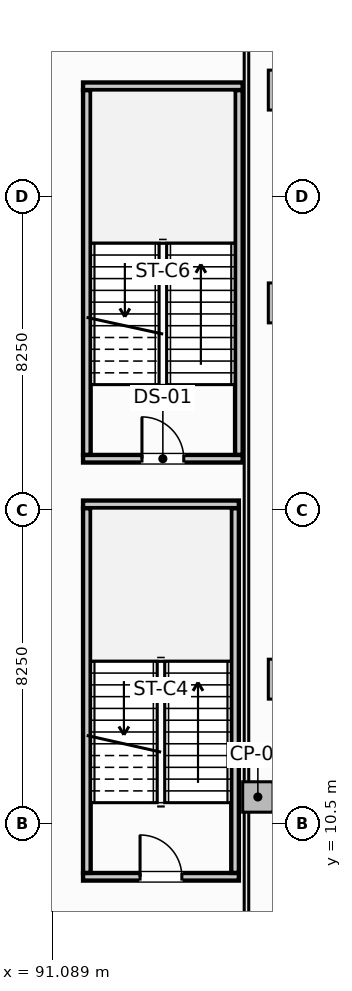
"""IFC4 building model, lengths in metres.
Left out: names, types, materials, properties, quantities, classifications, styles, units other than length and angle.
Written with IfcOpenShell. Run it as: python <this file> out.ifc"""

import sys

from ifc_helpers import new_model, si_unit, direction, frame, frame_2d, origin, origin_2d, place, context, subcontext, project, spatial, rectangle, extrude, element, fill, save


model = new_model("IFC4")
c1 = context("Model", 3, precision=1e-05, world=origin(), true_north=direction((0.0, 1.0)))
c2 = subcontext(c1, "Body", "Model", "MODEL_VIEW")
j1 = project(units=[si_unit("LENGTHUNIT", "METRE"), si_unit("PLANEANGLEUNIT", "RADIAN")], contexts=[c1])
p1 = place(None, origin())
s1 = spatial("IfcSite", under=j1, at=p1, CompositionType="ELEMENT")
p2 = place(p1, origin())
s2 = spatial("IfcBuilding", under=s1, at=p2, CompositionType="ELEMENT")
p3 = place(p2, frame((0.0, 0.0, -13.5)))
s3 = spatial("IfcBuildingStorey", under=s2, at=p3, CompositionType="ELEMENT", Elevation=-13.5)
for number, where, z_axis, x_axis in (
    (1, (97.3, 14.3, -0.5), (0.0, 0.0, 1.0), (1.0, 0.0, 0.0)),
    (2, (97.3, 24.2, -0.5), (0.0, 0.0, 1.0), (1.0, 0.0, 0.0)),
    (3, (97.3, 29.8, -0.5), (0.0, 0.0, 1.0), (1.0, 0.0, 0.0)),
):
    element("IfcColumn", number, at=place(p3, frame(where, z_axis=z_axis, x_axis=x_axis)), inside=s3, PredefinedType="COLUMN", context=c2, shape_type="SweptSolid", body=[
        extrude(rectangle(XDim=1.05, YDim=1.05, at=origin_2d()), origin(), (0.0, 0.0, 1.0), 4.68),
    ])
p4 = place(p3, frame((96.5, 11.2, -0.5), z_axis=(0.0, 0.0, 1.0), x_axis=(1.0, 0.0, 0.0)))
e4 = element("IfcColumn", 4, at=p4, inside=s3, PredefinedType="PILASTER", context=c2, shape_type="SweptSolid", body=[
    extrude(rectangle(XDim=0.8, YDim=0.8, at=origin_2d()), origin(), (0.0, 0.0, 1.0), 4.68),
])
p5 = place(p3, frame((91.9, 9.1, -0.5), z_axis=(0.0, 0.0, 1.0), x_axis=(1.0, 0.0, 0.0)))
e5 = element("IfcWall", 5, at=p5, inside=s3, PredefinedType="SHEAR", context=c2, shape_type="SweptSolid", body=[
    extrude(rectangle(XDim=4.1, YDim=0.2, at=frame_2d((2.05, 0.0))), origin(), (0.0, 0.0, 1.0), 4.68),
])
p6 = place(p5, frame((1.5, 0.0, 0.5)))
e6 = element("IfcOpeningElement", 6, at=p6, cuts=e5, PredefinedType="OPENING", context=c2, shape_type="SweptSolid", body=[
    extrude(rectangle(XDim=1.1, YDim=2.15, at=frame_2d((0.55, 1.075))), frame((0.0, 0.11, 0.0), z_axis=(0.0, -1.0, 0.0), x_axis=(1.0, 0.0, 0.0)), (0.0, 0.0, 1.0), 0.22),
])
p7 = place(p3, frame((91.9, 18.9, -0.5), z_axis=(0.0, 0.0, 1.0), x_axis=(1.0, 0.0, 0.0)))
e7 = element("IfcWall", 7, at=p7, inside=s3, PredefinedType="SHEAR", context=c2, shape_type="SweptSolid", body=[
    extrude(rectangle(XDim=4.1, YDim=0.2, at=frame_2d((2.05, 0.0))), origin(), (0.0, 0.0, 1.0), 4.68),
])
for number, where, z_axis, x_axis in (
    (8, (92.0, 9.202, -0.5), (0.0, 0.0, 1.0), (0.0, 1.0, 0.0)),
    (9, (95.9, 9.202, -0.5), (0.0, 0.0, 1.0), (0.0, 1.0, 0.0)),
):
    element("IfcWall", number, at=place(p3, frame(where, z_axis=z_axis, x_axis=x_axis)), inside=s3, PredefinedType="SHEAR", context=c2, shape_type="SweptSolid", body=[
        extrude(rectangle(XDim=9.596, YDim=0.2, at=frame_2d((4.798, 0.0))), origin(), (0.0, 0.0, 1.0), 4.68),
    ])
p8 = place(p3, frame((91.9, 20.1, -0.5), z_axis=(0.0, 0.0, 1.0), x_axis=(1.0, 0.0, 0.0)))
e10 = element("IfcWall", 10, at=p8, inside=s3, PredefinedType="SHEAR", context=c2, shape_type="SweptSolid", body=[
    extrude(rectangle(XDim=4.2, YDim=0.2, at=frame_2d((2.1, 0.0))), origin(), (0.0, 0.0, 1.0), 4.68),
])
p9 = place(p8, frame((1.55, 0.0, 0.5)))
e11 = element("IfcOpeningElement", 11, at=p9, cuts=e10, PredefinedType="OPENING", context=c2, shape_type="SweptSolid", body=[
    extrude(rectangle(XDim=1.1, YDim=2.15, at=frame_2d((0.55, 1.075))), frame((0.0, 0.11, 0.0), z_axis=(0.0, -1.0, 0.0), x_axis=(1.0, 0.0, 0.0)), (0.0, 0.0, 1.0), 0.22),
])
p10 = place(p3, frame((91.9, 29.9, -0.5), z_axis=(0.0, 0.0, 1.0), x_axis=(1.0, 0.0, 0.0)))
e12 = element("IfcWall", 12, at=p10, inside=s3, PredefinedType="SHEAR", context=c2, shape_type="SweptSolid", body=[
    extrude(rectangle(XDim=4.2, YDim=0.2, at=frame_2d((2.1, 0.0))), origin(), (0.0, 0.0, 1.0), 4.68),
])
for number, where, z_axis, x_axis in (
    (13, (92.0, 20.202, -0.5), (0.0, 0.0, 1.0), (0.0, 1.0, 0.0)),
    (14, (96.0, 20.202, -0.5), (0.0, 0.0, 1.0), (0.0, 1.0, 0.0)),
):
    element("IfcWall", number, at=place(p3, frame(where, z_axis=z_axis, x_axis=x_axis)), inside=s3, PredefinedType="SHEAR", context=c2, shape_type="SweptSolid", body=[
        extrude(rectangle(XDim=9.596, YDim=0.2, at=frame_2d((4.798, 0.0))), origin(), (0.0, 0.0, 1.0), 4.68),
    ])
p11 = place(p3, frame((96.2, 6.612, 0.0), z_axis=(0.0, 0.0, 1.0), x_axis=(0.0, 1.0, 0.0)))
e15 = element("IfcWall", 15, at=p11, inside=s3, PredefinedType="PARTITIONING", context=c2, shape_type="SweptSolid", body=[
    extrude(rectangle(XDim=39.976, YDim=0.12, at=frame_2d((19.988, 0.0))), origin(), (0.0, 0.0, 1.0), 4.18),
])
p12 = place(p6, origin())
e16 = element("IfcDoor", 16, at=p12, inside=s3, OperationType="SINGLE_SWING_LEFT", PredefinedType="DOOR", context=c2, shape_type="SweptSolid", body=[
    extrude(rectangle(XDim=1.1, YDim=2.15, at=frame_2d((0.55, 1.075))), frame((0.0, 0.025, 0.0), z_axis=(0.0, -1.0, 0.0), x_axis=(1.0, 0.0, 0.0)), (0.0, 0.0, 1.0), 0.05),
])
fill(e6, e16)
p13 = place(p9, origin())
e17 = element("IfcDoor", 17, at=p13, inside=s3, OperationType="SINGLE_SWING_LEFT", PredefinedType="DOOR", context=c2, shape_type="SweptSolid", body=[
    extrude(rectangle(XDim=1.1, YDim=2.15, at=frame_2d((0.55, 1.075))), frame((0.0, 0.025, 0.0), z_axis=(0.0, -1.0, 0.0), x_axis=(1.0, 0.0, 0.0)), (0.0, 0.0, 1.0), 0.05),
])
fill(e11, e17)
save(model, sys.argv[1])
